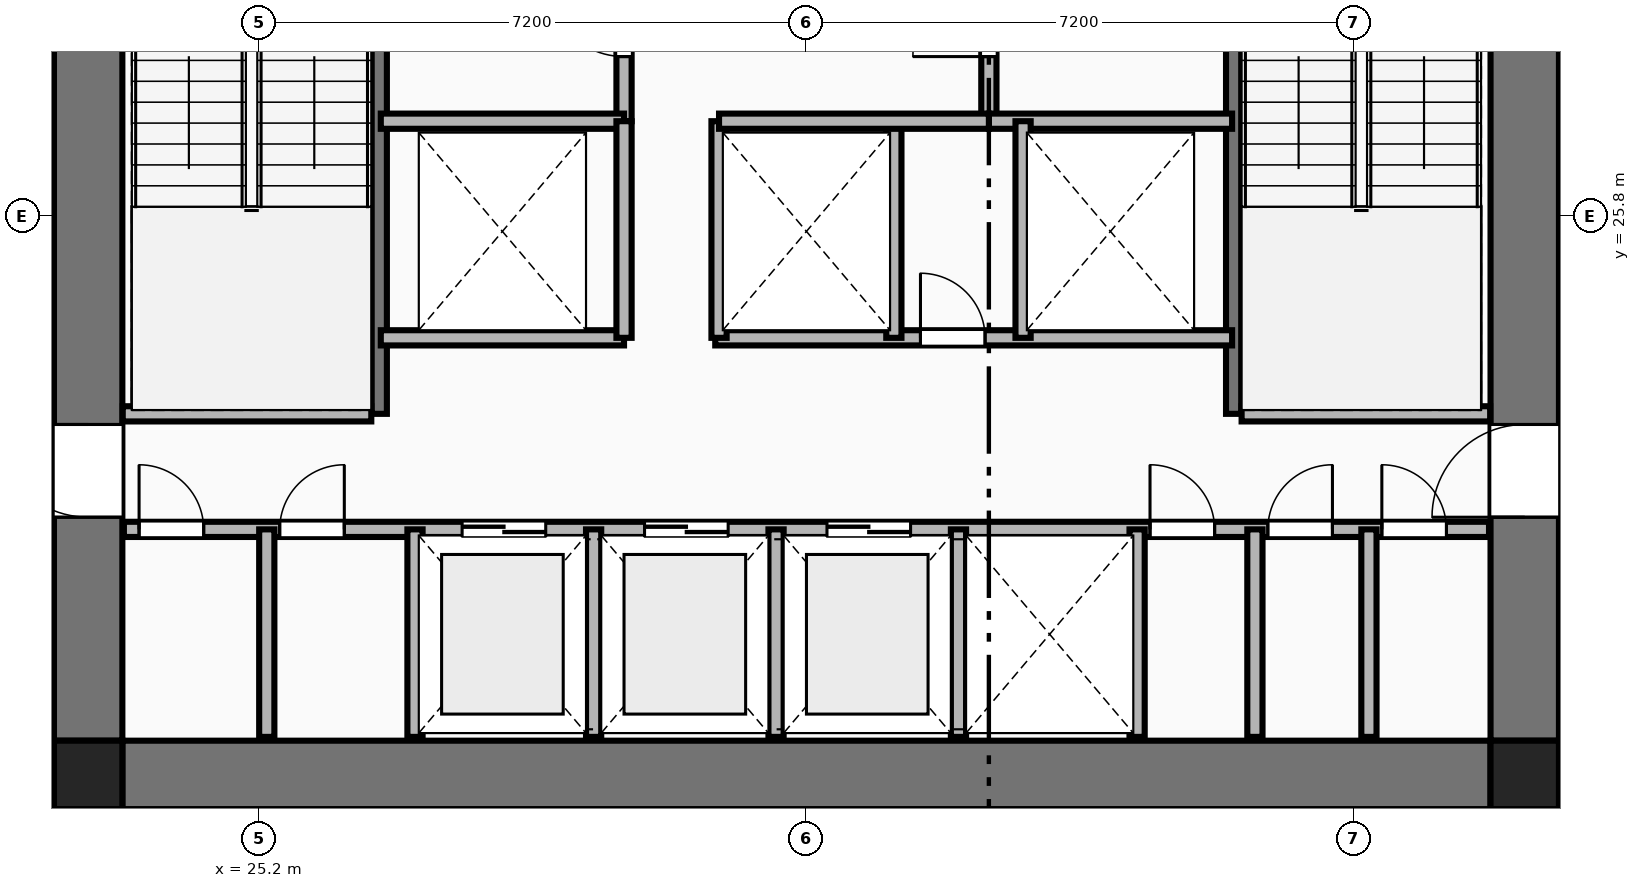
"""IFC4 building model, lengths in metres.
Left out: names, types, materials, properties, quantities, classifications, styles, units other than length and angle.
Written with IfcOpenShell. Run it as: python <this file> out.ifc"""

import sys

from ifc_helpers import new_model, si_unit, direction, frame, frame_2d, origin, origin_2d, place, context, subcontext, project, spatial, rectangle, extrude, element, fill, save


model = new_model("IFC4")
c1 = context("Model", 3, precision=1e-05, world=origin(), true_north=direction((0.0, 1.0)))
c2 = subcontext(c1, "Body", "Model", "MODEL_VIEW")
j1 = project(units=[si_unit("LENGTHUNIT", "METRE"), si_unit("PLANEANGLEUNIT", "RADIAN")], contexts=[c1])
p1 = place(None, origin())
s1 = spatial("IfcSite", under=j1, at=p1, CompositionType="ELEMENT")
p2 = place(p1, origin())
s2 = spatial("IfcBuilding", under=s1, at=p2, CompositionType="ELEMENT")
p3 = place(p2, frame((0.0, 0.0, 56.85)))
s3 = spatial("IfcBuildingStorey", under=s2, at=p3, CompositionType="ELEMENT", Elevation=56.85)
for number, where, z_axis, x_axis in (
    (1, (22.95, 18.45, 0.0), (0.0, 0.0, 1.0), (1.0, 0.0, 0.0)),
    (2, (41.85, 18.45, 0.0), (0.0, 0.0, 1.0), (1.0, 0.0, 0.0)),
):
    element("IfcColumn", number, at=place(p3, frame(where, z_axis=z_axis, x_axis=x_axis)), inside=s3, PredefinedType="COLUMN", context=c2, shape_type="SweptSolid", body=[
        extrude(rectangle(XDim=0.9, YDim=0.9, at=origin_2d()), origin(), (0.0, 0.0, 1.0), 3.55),
    ])
p4 = place(p3, frame((23.4, 18.45, 0.0), z_axis=(0.0, 0.0, 1.0), x_axis=(1.0, 0.0, 0.0)))
e3 = element("IfcWall", 3, at=p4, inside=s3, PredefinedType="SHEAR", context=c2, shape_type="SweptSolid", body=[
    extrude(rectangle(XDim=18.0, YDim=0.9, at=frame_2d((9.0, 0.0))), origin(), (0.0, 0.0, 1.0), 3.33),
])
p5 = place(p3, frame((22.95, 18.9, 0.0), z_axis=(0.0, 0.0, 1.0), x_axis=(0.0, 1.0, 0.0)))
e4 = element("IfcWall", 4, at=p5, inside=s3, PredefinedType="SHEAR", context=c2, shape_type="SweptSolid", body=[
    extrude(rectangle(XDim=14.0, YDim=0.9, at=frame_2d((7.0, 0.0))), origin(), (0.0, 0.0, 1.0), 3.33),
])
p6 = place(p5, frame((2.94, 0.0, 0.0)))
e5 = element("IfcOpeningElement", 5, at=p6, cuts=e4, PredefinedType="OPENING", context=c2, shape_type="SweptSolid", body=[
    extrude(rectangle(XDim=1.22, YDim=2.25, at=frame_2d((0.61, 1.125))), frame((0.0, 0.46, 0.0), z_axis=(0.0, -1.0, 0.0), x_axis=(1.0, 0.0, 0.0)), (0.0, 0.0, 1.0), 0.92),
])
p7 = place(p3, frame((41.85, 18.9, 0.0), z_axis=(0.0, 0.0, 1.0), x_axis=(0.0, 1.0, 0.0)))
e6 = element("IfcWall", 6, at=p7, inside=s3, PredefinedType="SHEAR", context=c2, shape_type="SweptSolid", body=[
    extrude(rectangle(XDim=14.0, YDim=0.9, at=frame_2d((7.0, 0.0))), origin(), (0.0, 0.0, 1.0), 3.33),
])
p8 = place(p7, frame((2.94, 0.0, 0.0)))
e7 = element("IfcOpeningElement", 7, at=p8, cuts=e6, PredefinedType="OPENING", context=c2, shape_type="SweptSolid", body=[
    extrude(rectangle(XDim=1.22, YDim=2.25, at=frame_2d((0.61, 1.125))), frame((0.0, 0.46, 0.0), z_axis=(0.0, -1.0, 0.0), x_axis=(1.0, 0.0, 0.0)), (0.0, 0.0, 1.0), 0.92),
])
p9 = place(p3, frame((26.78, 23.2, 0.0), z_axis=(0.0, 0.0, 1.0), x_axis=(0.0, 1.0, 0.0)))
e8 = element("IfcWall", 8, at=p9, inside=s3, PredefinedType="SHEAR", context=c2, shape_type="SweptSolid", body=[
    extrude(rectangle(XDim=6.78, YDim=0.2, at=frame_2d((3.39, 0.0))), origin(), (0.0, 0.0, 1.0), 3.55),
])
p10 = place(p9, frame((5.32, 0.0, 0.0)))
e9 = element("IfcOpeningElement", 9, at=p10, cuts=e8, PredefinedType="OPENING", context=c2, shape_type="SweptSolid", body=[
    extrude(rectangle(XDim=1.05, YDim=2.15, at=frame_2d((0.525, 1.075))), frame((0.0, 0.11, 0.0), z_axis=(0.0, -1.0, 0.0), x_axis=(1.0, 0.0, 0.0)), (0.0, 0.0, 1.0), 0.22),
])
p11 = place(p3, frame((23.405, 23.2, 0.0), z_axis=(0.0, 0.0, 1.0), x_axis=(1.0, 0.0, 0.0)))
e10 = element("IfcWall", 10, at=p11, inside=s3, PredefinedType="PLUMBINGWALL", context=c2, shape_type="SweptSolid", body=[
    extrude(rectangle(XDim=3.27, YDim=0.2, at=frame_2d((1.635, 0.0))), origin(), (0.0, 0.0, 1.0), 3.33),
])
p12 = place(p3, frame((38.02, 23.2, 0.0), z_axis=(0.0, 0.0, 1.0), x_axis=(0.0, 1.0, 0.0)))
e11 = element("IfcWall", 11, at=p12, inside=s3, PredefinedType="SHEAR", context=c2, shape_type="SweptSolid", body=[
    extrude(rectangle(XDim=6.78, YDim=0.2, at=frame_2d((3.39, 0.0))), origin(), (0.0, 0.0, 1.0), 3.55),
])
p13 = place(p12, frame((5.32, 0.0, 0.0)))
e12 = element("IfcOpeningElement", 12, at=p13, cuts=e11, PredefinedType="OPENING", context=c2, shape_type="SweptSolid", body=[
    extrude(rectangle(XDim=1.05, YDim=2.15, at=frame_2d((0.525, 1.075))), frame((0.0, 0.11, 0.0), z_axis=(0.0, -1.0, 0.0), x_axis=(1.0, 0.0, 0.0)), (0.0, 0.0, 1.0), 0.22),
])
p14 = place(p3, frame((38.125, 23.2, 0.0), z_axis=(0.0, 0.0, 1.0), x_axis=(1.0, 0.0, 0.0)))
e13 = element("IfcWall", 13, at=p14, inside=s3, PredefinedType="PLUMBINGWALL", context=c2, shape_type="SweptSolid", body=[
    extrude(rectangle(XDim=3.27, YDim=0.2, at=frame_2d((1.635, 0.0))), origin(), (0.0, 0.0, 1.0), 3.33),
])
p15 = place(p3, frame((30.0, 27.05, 0.0), z_axis=(0.0, 0.0, 1.0), x_axis=(0.0, 1.0, 0.0)))
e14 = element("IfcWall", 14, at=p15, inside=s3, PredefinedType="PLUMBINGWALL", context=c2, shape_type="SweptSolid", body=[
    extrude(rectangle(XDim=2.75, YDim=0.2, at=frame_2d((1.375, 0.0))), origin(), (0.0, 0.0, 1.0), 3.33),
])
p16 = place(p15, frame((0.85, 0.0, 0.0)))
e15 = element("IfcOpeningElement", 15, at=p16, cuts=e14, PredefinedType="OPENING", context=c2, shape_type="SweptSolid", body=[
    extrude(rectangle(XDim=1.0, YDim=2.15, at=frame_2d((0.5, 1.075))), frame((0.0, 0.11, 0.0), z_axis=(0.0, -1.0, 0.0), x_axis=(1.0, 0.0, 0.0)), (0.0, 0.0, 1.0), 0.22),
])
p17 = place(p3, frame((26.8, 27.05, 0.0), z_axis=(0.0, 0.0, 1.0), x_axis=(1.0, 0.0, 0.0)))
e16 = element("IfcWall", 16, at=p17, inside=s3, PredefinedType="PLUMBINGWALL", context=c2, shape_type="SweptSolid", body=[
    extrude(rectangle(XDim=3.2, YDim=0.2, at=frame_2d((1.6, 0.0))), origin(), (0.0, 0.0, 1.0), 3.33),
])
p18 = place(p3, frame((34.8, 27.05, 0.0), z_axis=(0.0, 0.0, 1.0), x_axis=(0.0, 1.0, 0.0)))
e17 = element("IfcWall", 17, at=p18, inside=s3, PredefinedType="PLUMBINGWALL", context=c2, shape_type="SweptSolid", body=[
    extrude(rectangle(XDim=2.75, YDim=0.2, at=frame_2d((1.375, 0.0))), origin(), (0.0, 0.0, 1.0), 3.33),
])
p19 = place(p18, frame((0.85, 0.0, 0.0)))
e18 = element("IfcOpeningElement", 18, at=p19, cuts=e17, PredefinedType="OPENING", context=c2, shape_type="SweptSolid", body=[
    extrude(rectangle(XDim=1.0, YDim=2.15, at=frame_2d((0.5, 1.075))), frame((0.0, 0.11, 0.0), z_axis=(0.0, -1.0, 0.0), x_axis=(1.0, 0.0, 0.0)), (0.0, 0.0, 1.0), 0.22),
])
for number, where, z_axis, x_axis in (
    (19, (34.8, 27.05, 0.0), (0.0, 0.0, 1.0), (1.0, 0.0, 0.0)),
    (20, (26.8, 24.2, 0.0), (0.0, 0.0, 1.0), (1.0, 0.0, 0.0)),
):
    element("IfcWall", number, at=place(p3, frame(where, z_axis=z_axis, x_axis=x_axis)), inside=s3, PredefinedType="PLUMBINGWALL", context=c2, shape_type="SweptSolid", body=[
        extrude(rectangle(XDim=3.2, YDim=0.2, at=frame_2d((1.6, 0.0))), origin(), (0.0, 0.0, 1.0), 3.33),
    ])
p20 = place(p3, frame((30.0, 24.2, 0.0), z_axis=(0.0, 0.0, 1.0), x_axis=(0.0, 1.0, 0.0)))
e21 = element("IfcWall", 21, at=p20, inside=s3, PredefinedType="PLUMBINGWALL", context=c2, shape_type="SweptSolid", body=[
    extrude(rectangle(XDim=2.85, YDim=0.2, at=frame_2d((1.425, 0.0))), origin(), (0.0, 0.0, 1.0), 3.33),
])
p21 = place(p3, frame((31.2, 24.2, 0.0), z_axis=(0.0, 0.0, 1.0), x_axis=(1.0, 0.0, 0.0)))
e22 = element("IfcWall", 22, at=p21, inside=s3, PredefinedType="PLUMBINGWALL", context=c2, shape_type="SweptSolid", body=[
    extrude(rectangle(XDim=6.8, YDim=0.2, at=frame_2d((3.4, 0.0))), origin(), (0.0, 0.0, 1.0), 3.33),
])
p22 = place(p21, frame((2.7, 0.0, 0.0)))
e23 = element("IfcOpeningElement", 23, at=p22, cuts=e22, PredefinedType="OPENING", context=c2, shape_type="SweptSolid", body=[
    extrude(rectangle(XDim=0.85, YDim=2.05, at=frame_2d((0.425, 1.025))), frame((0.0, 0.11, 0.0), z_axis=(0.0, -1.0, 0.0), x_axis=(1.0, 0.0, 0.0)), (0.0, 0.0, 1.0), 0.22),
])
for number, where, z_axis, x_axis in (
    (24, (31.25, 24.2, 0.0), (0.0, 0.0, 1.0), (0.0, 1.0, 0.0)),
    (25, (33.55, 24.2, 0.0), (0.0, 0.0, 1.0), (0.0, 1.0, 0.0)),
    (26, (35.25, 24.2, 0.0), (0.0, 0.0, 1.0), (0.0, 1.0, 0.0)),
):
    element("IfcWall", number, at=place(p3, frame(where, z_axis=z_axis, x_axis=x_axis)), inside=s3, PredefinedType="PLUMBINGWALL", context=c2, shape_type="SweptSolid", body=[
        extrude(rectangle(XDim=2.85, YDim=0.2, at=frame_2d((1.425, 0.0))), origin(), (0.0, 0.0, 1.0), 3.33),
    ])
p23 = place(p3, frame((31.25, 27.05, 0.0), z_axis=(0.0, 0.0, 1.0), x_axis=(1.0, 0.0, 0.0)))
e27 = element("IfcWall", 27, at=p23, inside=s3, PredefinedType="PLUMBINGWALL", context=c2, shape_type="SweptSolid", body=[
    extrude(rectangle(XDim=3.55, YDim=0.2, at=frame_2d((1.775, 0.0))), origin(), (0.0, 0.0, 1.0), 3.33),
])
p24 = place(p3, frame((23.42, 21.68, 0.0), z_axis=(0.0, 0.0, 1.0), x_axis=(1.0, 0.0, 0.0)))
e28 = element("IfcWall", 28, at=p24, inside=s3, PredefinedType="PLUMBINGWALL", context=c2, shape_type="SweptSolid", body=[
    extrude(rectangle(XDim=17.96, YDim=0.2, at=frame_2d((8.98, 0.0))), origin(), (0.0, 0.0, 1.0), 3.33),
])
p25 = place(p24, frame((4.45, 0.0, 0.0)))
e29 = element("IfcOpeningElement", 29, at=p25, cuts=e28, PredefinedType="OPENING", context=c2, shape_type="SweptSolid", body=[
    extrude(rectangle(XDim=1.1, YDim=2.2, at=frame_2d((0.55, 1.1))), frame((0.0, 0.11, 0.0), z_axis=(0.0, -1.0, 0.0), x_axis=(1.0, 0.0, 0.0)), (0.0, 0.0, 1.0), 0.22),
])
p26 = place(p24, frame((6.85, 0.0, 0.0)))
e30 = element("IfcOpeningElement", 30, at=p26, cuts=e28, PredefinedType="OPENING", context=c2, shape_type="SweptSolid", body=[
    extrude(rectangle(XDim=1.1, YDim=2.2, at=frame_2d((0.55, 1.1))), frame((0.0, 0.11, 0.0), z_axis=(0.0, -1.0, 0.0), x_axis=(1.0, 0.0, 0.0)), (0.0, 0.0, 1.0), 0.22),
])
p27 = place(p24, frame((9.25, 0.0, 0.0)))
e31 = element("IfcOpeningElement", 31, at=p27, cuts=e28, PredefinedType="OPENING", context=c2, shape_type="SweptSolid", body=[
    extrude(rectangle(XDim=1.1, YDim=2.2, at=frame_2d((0.55, 1.1))), frame((0.0, 0.11, 0.0), z_axis=(0.0, -1.0, 0.0), x_axis=(1.0, 0.0, 0.0)), (0.0, 0.0, 1.0), 0.22),
])
p28 = place(p24, frame((0.2, 0.0, 0.0)))
e32 = element("IfcOpeningElement", 32, at=p28, cuts=e28, PredefinedType="OPENING", context=c2, shape_type="SweptSolid", body=[
    extrude(rectangle(XDim=0.85, YDim=2.05, at=frame_2d((0.425, 1.025))), frame((0.0, 0.11, 0.0), z_axis=(0.0, -1.0, 0.0), x_axis=(1.0, 0.0, 0.0)), (0.0, 0.0, 1.0), 0.22),
])
p29 = place(p24, frame((2.05, 0.0, 0.0)))
e33 = element("IfcOpeningElement", 33, at=p29, cuts=e28, PredefinedType="OPENING", context=c2, shape_type="SweptSolid", body=[
    extrude(rectangle(XDim=0.85, YDim=2.05, at=frame_2d((0.425, 1.025))), frame((0.0, 0.11, 0.0), z_axis=(0.0, -1.0, 0.0), x_axis=(1.0, 0.0, 0.0)), (0.0, 0.0, 1.0), 0.22),
])
p30 = place(p24, frame((13.5, 0.0, 0.0)))
e34 = element("IfcOpeningElement", 34, at=p30, cuts=e28, PredefinedType="OPENING", context=c2, shape_type="SweptSolid", body=[
    extrude(rectangle(XDim=0.85, YDim=2.05, at=frame_2d((0.425, 1.025))), frame((0.0, 0.11, 0.0), z_axis=(0.0, -1.0, 0.0), x_axis=(1.0, 0.0, 0.0)), (0.0, 0.0, 1.0), 0.22),
])
p31 = place(p24, frame((15.05, 0.0, 0.0)))
e35 = element("IfcOpeningElement", 35, at=p31, cuts=e28, PredefinedType="OPENING", context=c2, shape_type="SweptSolid", body=[
    extrude(rectangle(XDim=0.85, YDim=2.05, at=frame_2d((0.425, 1.025))), frame((0.0, 0.11, 0.0), z_axis=(0.0, -1.0, 0.0), x_axis=(1.0, 0.0, 0.0)), (0.0, 0.0, 1.0), 0.22),
])
p32 = place(p24, frame((16.55, 0.0, 0.0)))
e36 = element("IfcOpeningElement", 36, at=p32, cuts=e28, PredefinedType="OPENING", context=c2, shape_type="SweptSolid", body=[
    extrude(rectangle(XDim=0.85, YDim=2.05, at=frame_2d((0.425, 1.025))), frame((0.0, 0.11, 0.0), z_axis=(0.0, -1.0, 0.0), x_axis=(1.0, 0.0, 0.0)), (0.0, 0.0, 1.0), 0.22),
])
for number, where, z_axis, x_axis in (
    (37, (27.25, 18.95, 0.0), (0.0, 0.0, 1.0), (0.0, 1.0, 0.0)),
    (38, (29.6, 18.95, 0.0), (0.0, 0.0, 1.0), (0.0, 1.0, 0.0)),
    (39, (32.0, 18.95, 0.0), (0.0, 0.0, 1.0), (0.0, 1.0, 0.0)),
    (40, (34.4, 18.95, 0.0), (0.0, 0.0, 1.0), (0.0, 1.0, 0.0)),
    (41, (36.75, 18.95, 0.0), (0.0, 0.0, 1.0), (0.0, 1.0, 0.0)),
    (42, (25.3, 18.95, 0.0), (0.0, 0.0, 1.0), (0.0, 1.0, 0.0)),
    (43, (38.3, 18.95, 0.0), (0.0, 0.0, 1.0), (0.0, 1.0, 0.0)),
    (44, (39.8, 18.95, 0.0), (0.0, 0.0, 1.0), (0.0, 1.0, 0.0)),
):
    element("IfcWall", number, at=place(p3, frame(where, z_axis=z_axis, x_axis=x_axis)), inside=s3, PredefinedType="PLUMBINGWALL", context=c2, shape_type="SweptSolid", body=[
        extrude(rectangle(XDim=2.73, YDim=0.2, at=frame_2d((1.365, 0.0))), origin(), (0.0, 0.0, 1.0), 3.33),
    ])
p33 = place(p6, origin())
e45 = element("IfcDoor", 45, at=p33, inside=s3, OperationType="SINGLE_SWING_RIGHT", PredefinedType="DOOR", context=c2, shape_type="SweptSolid", body=[
    extrude(rectangle(XDim=1.22, YDim=2.25, at=frame_2d((0.61, 1.125))), frame((0.0, 0.025, 0.0), z_axis=(0.0, -1.0, 0.0), x_axis=(1.0, 0.0, 0.0)), (0.0, 0.0, 1.0), 0.05),
])
fill(e5, e45)
p34 = place(p8, origin())
e46 = element("IfcDoor", 46, at=p34, inside=s3, OperationType="SINGLE_SWING_LEFT", PredefinedType="DOOR", context=c2, shape_type="SweptSolid", body=[
    extrude(rectangle(XDim=1.22, YDim=2.25, at=frame_2d((0.61, 1.125))), frame((0.0, 0.025, 0.0), z_axis=(0.0, -1.0, 0.0), x_axis=(1.0, 0.0, 0.0)), (0.0, 0.0, 1.0), 0.05),
])
fill(e7, e46)
p35 = place(p16, origin())
e47 = element("IfcDoor", 47, at=p35, inside=s3, OperationType="SINGLE_SWING_RIGHT", PredefinedType="DOOR", context=c2, shape_type="SweptSolid", body=[
    extrude(rectangle(XDim=1.0, YDim=2.15, at=frame_2d((0.5, 1.075))), frame((0.0, 0.025, 0.0), z_axis=(0.0, -1.0, 0.0), x_axis=(1.0, 0.0, 0.0)), (0.0, 0.0, 1.0), 0.05),
])
fill(e15, e47)
p36 = place(p19, origin())
e48 = element("IfcDoor", 48, at=p36, inside=s3, OperationType="SINGLE_SWING_LEFT", PredefinedType="DOOR", context=c2, shape_type="SweptSolid", body=[
    extrude(rectangle(XDim=1.0, YDim=2.15, at=frame_2d((0.5, 1.075))), frame((0.0, 0.025, 0.0), z_axis=(0.0, -1.0, 0.0), x_axis=(1.0, 0.0, 0.0)), (0.0, 0.0, 1.0), 0.05),
])
fill(e18, e48)
p37 = place(p22, origin())
e49 = element("IfcDoor", 49, at=p37, inside=s3, OperationType="SINGLE_SWING_LEFT", PredefinedType="DOOR", context=c2, shape_type="SweptSolid", body=[
    extrude(rectangle(XDim=0.85, YDim=2.05, at=frame_2d((0.425, 1.025))), frame((0.0, 0.025, 0.0), z_axis=(0.0, -1.0, 0.0), x_axis=(1.0, 0.0, 0.0)), (0.0, 0.0, 1.0), 0.05),
])
fill(e23, e49)
p38 = place(p25, origin())
e50 = element("IfcDoor", 50, at=p38, inside=s3, OperationType="DOUBLE_DOOR_SLIDING", PredefinedType="DOOR", context=c2, shape_type="SweptSolid", body=[
    extrude(rectangle(XDim=1.1, YDim=2.2, at=frame_2d((0.55, 1.1))), frame((0.0, 0.025, 0.0), z_axis=(0.0, -1.0, 0.0), x_axis=(1.0, 0.0, 0.0)), (0.0, 0.0, 1.0), 0.05),
])
fill(e29, e50)
p39 = place(p26, origin())
e51 = element("IfcDoor", 51, at=p39, inside=s3, OperationType="DOUBLE_DOOR_SLIDING", PredefinedType="DOOR", context=c2, shape_type="SweptSolid", body=[
    extrude(rectangle(XDim=1.1, YDim=2.2, at=frame_2d((0.55, 1.1))), frame((0.0, 0.025, 0.0), z_axis=(0.0, -1.0, 0.0), x_axis=(1.0, 0.0, 0.0)), (0.0, 0.0, 1.0), 0.05),
])
fill(e30, e51)
p40 = place(p27, origin())
e52 = element("IfcDoor", 52, at=p40, inside=s3, OperationType="DOUBLE_DOOR_SLIDING", PredefinedType="DOOR", context=c2, shape_type="SweptSolid", body=[
    extrude(rectangle(XDim=1.1, YDim=2.2, at=frame_2d((0.55, 1.1))), frame((0.0, 0.025, 0.0), z_axis=(0.0, -1.0, 0.0), x_axis=(1.0, 0.0, 0.0)), (0.0, 0.0, 1.0), 0.05),
])
fill(e31, e52)
p41 = place(p28, origin())
e53 = element("IfcDoor", 53, at=p41, inside=s3, OperationType="SINGLE_SWING_LEFT", PredefinedType="DOOR", context=c2, shape_type="SweptSolid", body=[
    extrude(rectangle(XDim=0.85, YDim=2.05, at=frame_2d((0.425, 1.025))), frame((0.0, 0.025, 0.0), z_axis=(0.0, -1.0, 0.0), x_axis=(1.0, 0.0, 0.0)), (0.0, 0.0, 1.0), 0.05),
])
fill(e32, e53)
p42 = place(p29, origin())
e54 = element("IfcDoor", 54, at=p42, inside=s3, OperationType="SINGLE_SWING_RIGHT", PredefinedType="DOOR", context=c2, shape_type="SweptSolid", body=[
    extrude(rectangle(XDim=0.85, YDim=2.05, at=frame_2d((0.425, 1.025))), frame((0.0, 0.025, 0.0), z_axis=(0.0, -1.0, 0.0), x_axis=(1.0, 0.0, 0.0)), (0.0, 0.0, 1.0), 0.05),
])
fill(e33, e54)
p43 = place(p30, origin())
e55 = element("IfcDoor", 55, at=p43, inside=s3, OperationType="SINGLE_SWING_LEFT", PredefinedType="DOOR", context=c2, shape_type="SweptSolid", body=[
    extrude(rectangle(XDim=0.85, YDim=2.05, at=frame_2d((0.425, 1.025))), frame((0.0, 0.025, 0.0), z_axis=(0.0, -1.0, 0.0), x_axis=(1.0, 0.0, 0.0)), (0.0, 0.0, 1.0), 0.05),
])
fill(e34, e55)
p44 = place(p31, origin())
e56 = element("IfcDoor", 56, at=p44, inside=s3, OperationType="SINGLE_SWING_RIGHT", PredefinedType="DOOR", context=c2, shape_type="SweptSolid", body=[
    extrude(rectangle(XDim=0.85, YDim=2.05, at=frame_2d((0.425, 1.025))), frame((0.0, 0.025, 0.0), z_axis=(0.0, -1.0, 0.0), x_axis=(1.0, 0.0, 0.0)), (0.0, 0.0, 1.0), 0.05),
])
fill(e35, e56)
p45 = place(p32, origin())
e57 = element("IfcDoor", 57, at=p45, inside=s3, OperationType="SINGLE_SWING_LEFT", PredefinedType="DOOR", context=c2, shape_type="SweptSolid", body=[
    extrude(rectangle(XDim=0.85, YDim=2.05, at=frame_2d((0.425, 1.025))), frame((0.0, 0.025, 0.0), z_axis=(0.0, -1.0, 0.0), x_axis=(1.0, 0.0, 0.0)), (0.0, 0.0, 1.0), 0.05),
])
fill(e36, e57)
save(model, sys.argv[1])
